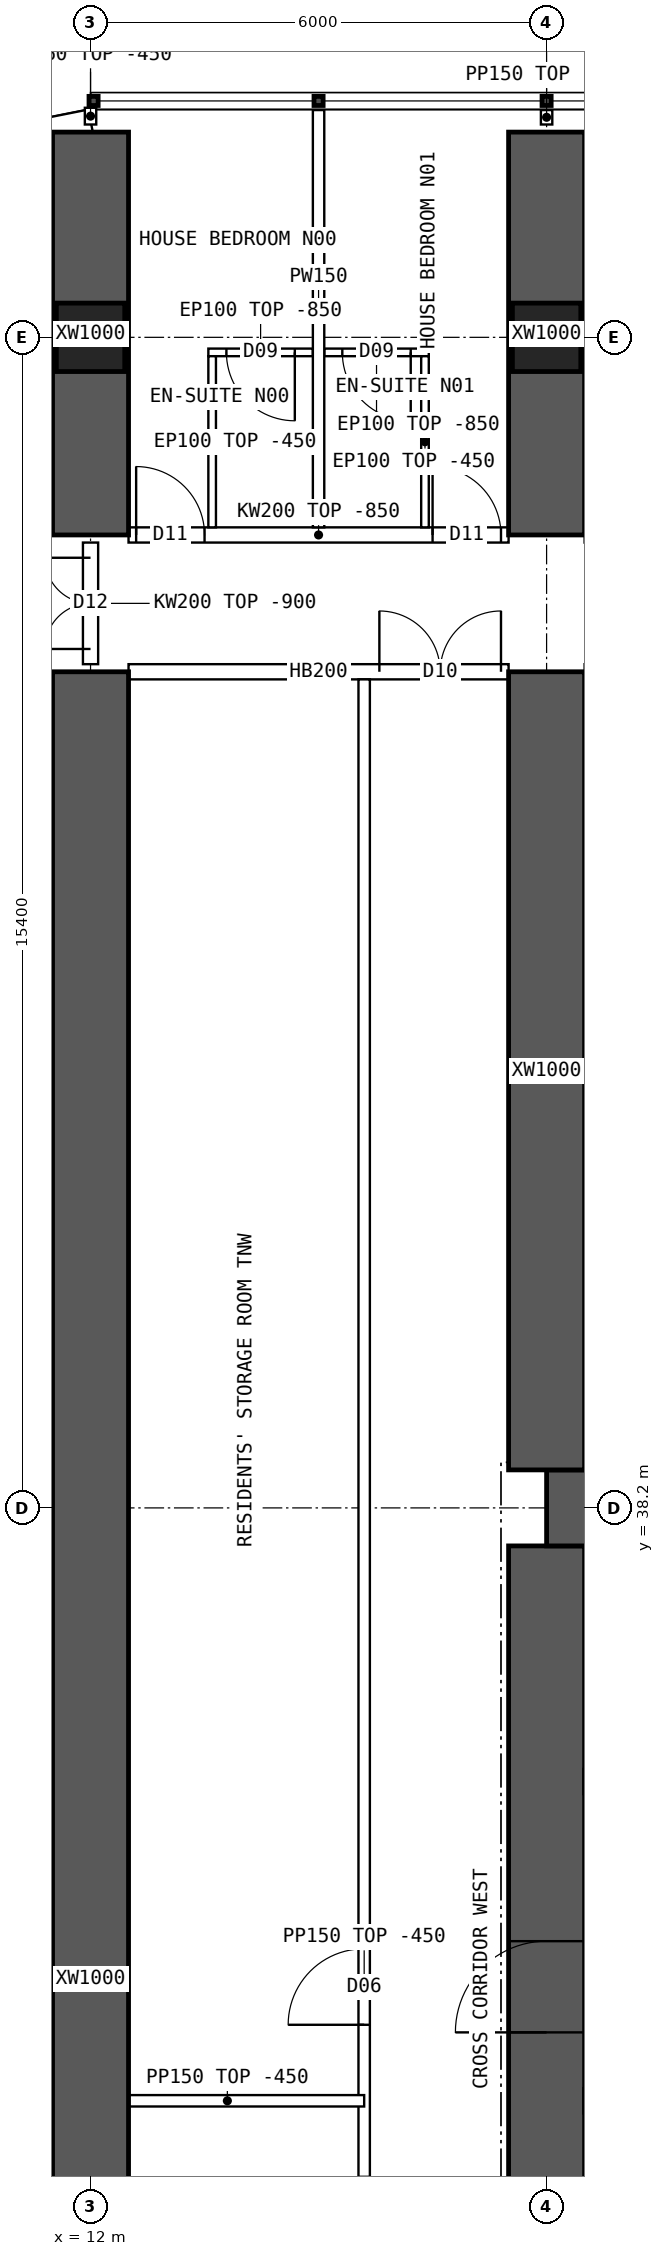
"""IFC4 building model, lengths in metres.
Left out: names, types, materials, properties, quantities, classifications, styles, units other than length and angle.
Written with IfcOpenShell. Run it as: python <this file> out.ifc"""

import sys

from ifc_helpers import new_model, si_unit, direction, frame, frame_2d, origin, origin_2d, place, context, subcontext, project, spatial, polyline, rectangle, hollow_rectangle, outline, extrude, element, fill, save


model = new_model("IFC4")
c1 = context("Model", 3, precision=1e-05, world=origin(), true_north=direction((0.0, 1.0)))
c2 = subcontext(c1, "Body", "Model", "MODEL_VIEW")
j1 = project(units=[si_unit("LENGTHUNIT", "METRE"), si_unit("PLANEANGLEUNIT", "RADIAN")], contexts=[c1])
p1 = place(None, origin())
s1 = spatial("IfcSite", under=j1, at=p1, CompositionType="ELEMENT")
p2 = place(p1, origin())
s2 = spatial("IfcBuilding", under=s1, at=p2, CompositionType="ELEMENT")
p3 = place(p2, frame((0.0, 0.0, 35.2)))
s3 = spatial("IfcBuildingStorey", under=s2, at=p3, CompositionType="ELEMENT", Elevation=35.2)
for number, where, z_axis, x_axis in (
    (1, (12.0, 53.6, 0.0), (0.0, 0.0, 1.0), (1.0, 0.0, 0.0)),
    (2, (18.0, 53.6, 0.0), (0.0, 0.0, 1.0), (1.0, 0.0, 0.0)),
):
    element("IfcColumn", number, at=place(p3, frame(where, z_axis=z_axis, x_axis=x_axis)), inside=s3, PredefinedType="COLUMN", context=c2, shape_type="SweptSolid", body=[
        extrude(hollow_rectangle(XDim=0.9, YDim=0.9, WallThickness=0.09, at=origin_2d()), origin(), (0.0, 0.0, 1.0), 3.75),
    ])
p4 = place(p3, frame((18.0, 38.2, 0.0), z_axis=(0.0, 0.0, 1.0), x_axis=(1.0, 0.0, 0.0)))
e3 = element("IfcWall", 3, at=p4, inside=s3, PredefinedType="SHEAR", context=c2, shape_type="SweptSolid", body=[
    extrude(rectangle(XDim=48.0, YDim=1.0, at=frame_2d((24.0, 0.0))), origin(), (0.0, 0.0, 1.0), 3.75),
])
p5 = place(p3, frame((18.0, 26.3, 0.0), z_axis=(0.0, 0.0, 1.0), x_axis=(0.0, 1.0, 0.0)))
e4 = element("IfcWall", 4, at=p5, inside=s3, PredefinedType="SHEAR", context=c2, shape_type="SweptSolid", body=[
    extrude(rectangle(XDim=11.4, YDim=1.0, at=frame_2d((5.7, 0.0))), origin(), (0.0, 0.0, 1.0), 3.75),
])
p6 = place(p5, frame((5.0, 0.0, 0.0)))
e5 = element("IfcOpeningElement", 5, at=p6, cuts=e4, PredefinedType="OPENING", context=c2, shape_type="SweptSolid", body=[
    extrude(rectangle(XDim=1.2, YDim=2.1, at=frame_2d((0.6, 1.05))), frame((0.0, 0.51, 0.0), z_axis=(0.0, -1.0, 0.0), x_axis=(1.0, 0.0, 0.0)), (0.0, 0.0, 1.0), 1.02),
])
p7 = place(p3, frame((12.0, 51.0, 0.0), z_axis=(0.0, 0.0, 1.0), x_axis=(0.0, 1.0, 0.0)))
e6 = element("IfcWall", 6, at=p7, inside=s3, PredefinedType="SHEAR", context=c2, shape_type="SweptSolid", body=[
    extrude(rectangle(XDim=5.3, YDim=1.0, at=frame_2d((2.65, 0.0))), origin(), (0.0, 0.0, 1.0), 3.75),
])
p8 = place(p3, frame((12.0, 14.8, 0.0), z_axis=(0.0, 0.0, 1.0), x_axis=(0.0, 1.0, 0.0)))
e7 = element("IfcWall", 7, at=p8, inside=s3, PredefinedType="SHEAR", context=c2, shape_type="SweptSolid", body=[
    extrude(rectangle(XDim=34.4, YDim=1.0, at=frame_2d((17.2, 0.0))), origin(), (0.0, 0.0, 1.0), 3.75),
])
p9 = place(p3, frame((18.0, 51.0, 0.0), z_axis=(0.0, 0.0, 1.0), x_axis=(0.0, 1.0, 0.0)))
e8 = element("IfcWall", 8, at=p9, inside=s3, PredefinedType="SHEAR", context=c2, shape_type="SweptSolid", body=[
    extrude(rectangle(XDim=5.3, YDim=1.0, at=frame_2d((2.65, 0.0))), origin(), (0.0, 0.0, 1.0), 3.75),
])
p10 = place(p3, frame((18.0, 38.7, 0.0), z_axis=(0.0, 0.0, 1.0), x_axis=(0.0, 1.0, 0.0)))
e9 = element("IfcWall", 9, at=p10, inside=s3, PredefinedType="SHEAR", context=c2, shape_type="SweptSolid", body=[
    extrude(rectangle(XDim=10.5, YDim=1.0, at=frame_2d((5.25, 0.0))), origin(), (0.0, 0.0, 1.0), 3.75),
])
p11 = place(p3, frame((12.0, 56.45, 0.0), z_axis=(0.0, 0.0, 1.0), x_axis=(-0.980787251524, -0.195080412259, 0.0)))
e10 = element("IfcWall", 10, at=p11, inside=s3, PredefinedType="SOLIDWALL", context=c2, shape_type="SweptSolid", body=[
    extrude(outline(polyline([(-0.03, -0.15), (3.249, -0.15), (3.189, 0.15), (0.03, 0.15), (-0.03, -0.15)])), origin(), (0.0, 0.0, 1.0), 3.3),
])
p12 = place(p11, frame((0.909, 0.0, 0.9)))
e11 = element("IfcOpeningElement", 11, at=p12, cuts=e10, PredefinedType="OPENING", context=c2, shape_type="SweptSolid", body=[
    extrude(rectangle(XDim=1.4, YDim=1.8, at=frame_2d((0.7, 0.9))), frame((0.0, 0.16, 0.0), z_axis=(0.0, -1.0, 0.0), x_axis=(1.0, 0.0, 0.0)), (0.0, 0.0, 1.0), 0.32),
])
p13 = place(p3, frame((12.5, 51.0, 0.0), z_axis=(0.0, 0.0, 1.0), x_axis=(1.0, 0.0, 0.0)))
e12 = element("IfcWall", 12, at=p13, inside=s3, PredefinedType="SOLIDWALL", context=c2, shape_type="SweptSolid", body=[
    extrude(outline(polyline([(0.0, 0.0), (5.0, 0.0), (5.0, 2.9), (0.0, 2.9), (0.0, 0.0)])), frame((0.0, 0.1, 0.0), z_axis=(0.0, -1.0, 0.0), x_axis=(1.0, 0.0, 0.0)), (0.0, 0.0, 1.0), 0.2),
])
p14 = place(p13, frame((0.1, 0.0, 0.0)))
e13 = element("IfcOpeningElement", 13, at=p14, cuts=e12, PredefinedType="OPENING", context=c2, shape_type="SweptSolid", body=[
    extrude(rectangle(XDim=0.9, YDim=2.1, at=frame_2d((0.45, 1.05))), frame((0.0, 0.11, 0.0), z_axis=(0.0, -1.0, 0.0), x_axis=(1.0, 0.0, 0.0)), (0.0, 0.0, 1.0), 0.22),
])
p15 = place(p13, frame((4.0, 0.0, 0.0)))
e14 = element("IfcOpeningElement", 14, at=p15, cuts=e12, PredefinedType="OPENING", context=c2, shape_type="SweptSolid", body=[
    extrude(rectangle(XDim=0.9, YDim=2.1, at=frame_2d((0.45, 1.05))), frame((0.0, 0.11, 0.0), z_axis=(0.0, -1.0, 0.0), x_axis=(1.0, 0.0, 0.0)), (0.0, 0.0, 1.0), 0.22),
])
p16 = place(p3, frame((12.5, 49.2, 0.0), z_axis=(0.0, 0.0, 1.0), x_axis=(1.0, 0.0, 0.0)))
e15 = element("IfcWall", 15, at=p16, inside=s3, PredefinedType="SOLIDWALL", context=c2, shape_type="SweptSolid", body=[
    extrude(rectangle(XDim=5.0, YDim=0.2, at=frame_2d((2.5, 0.0))), origin(), (0.0, 0.0, 1.0), 3.3),
])
p17 = place(p16, frame((3.3, 0.0, 0.0)))
e16 = element("IfcOpeningElement", 16, at=p17, cuts=e15, PredefinedType="OPENING", context=c2, shape_type="SweptSolid", body=[
    extrude(rectangle(XDim=1.6, YDim=2.1, at=frame_2d((0.8, 1.05))), frame((0.0, 0.11, 0.0), z_axis=(0.0, -1.0, 0.0), x_axis=(1.0, 0.0, 0.0)), (0.0, 0.0, 1.0), 0.22),
])
p18 = place(p3, frame((15.0, 56.59, 0.0), z_axis=(0.0, 0.0, 1.0), x_axis=(0.0, -1.0, 0.0)))
e17 = element("IfcWall", 17, at=p18, inside=s3, PredefinedType="PARTITIONING", context=c2, shape_type="SweptSolid", body=[
    extrude(outline(polyline([(0.0, 0.0), (5.49, 0.0), (5.49, 2.9), (5.442, 2.9), (5.44, 3.3), (3.192, 3.3), (3.19, 2.9), (2.792, 2.9), (2.79, 3.3), (0.0, 3.3), (0.0, 0.0)])), frame((0.0, 0.075, 0.0), z_axis=(0.0, -1.0, 0.0), x_axis=(1.0, 0.0, 0.0)), (0.0, 0.0, 1.0), 0.15),
])
p19 = place(p3, frame((13.55, 53.402, 0.0), z_axis=(0.0, 0.0, 1.0), x_axis=(1.0, 0.0, 0.0)))
e18 = element("IfcWall", 18, at=p19, inside=s3, PredefinedType="PARTITIONING", context=c2, shape_type="SweptSolid", body=[
    extrude(outline(polyline([(0.0, 0.0), (1.375, 0.0), (1.375, 2.9), (0.0, 2.9), (0.0, 0.0)])), frame((0.0, 0.05, 0.0), z_axis=(0.0, -1.0, 0.0), x_axis=(1.0, 0.0, 0.0)), (0.0, 0.0, 1.0), 0.1),
])
p20 = place(p19, frame((0.238, 0.0, 0.0)))
e19 = element("IfcOpeningElement", 19, at=p20, cuts=e18, PredefinedType="OPENING", context=c2, shape_type="SweptSolid", body=[
    extrude(rectangle(XDim=0.9, YDim=2.1, at=frame_2d((0.45, 1.05))), frame((0.0, 0.06, 0.0), z_axis=(0.0, -1.0, 0.0), x_axis=(1.0, 0.0, 0.0)), (0.0, 0.0, 1.0), 0.12),
])
p21 = place(p3, frame((13.6, 53.352, 0.0), z_axis=(0.0, 0.0, 1.0), x_axis=(0.0, -1.0, 0.0)))
e20 = element("IfcWall", 20, at=p21, inside=s3, PredefinedType="PARTITIONING", context=c2, shape_type="SweptSolid", body=[
    extrude(outline(polyline([(0.0, 0.0), (2.252, 0.0), (2.252, 2.9), (2.204, 2.9), (2.202, 3.3), (0.0, 3.3), (0.0, 0.0)])), frame((0.0, 0.05, 0.0), z_axis=(0.0, -1.0, 0.0), x_axis=(1.0, 0.0, 0.0)), (0.0, 0.0, 1.0), 0.1),
])
p22 = place(p3, frame((15.075, 53.402, 0.0), z_axis=(0.0, 0.0, 1.0), x_axis=(1.0, 0.0, 0.0)))
e21 = element("IfcWall", 21, at=p22, inside=s3, PredefinedType="PARTITIONING", context=c2, shape_type="SweptSolid", body=[
    extrude(outline(polyline([(0.0, 0.0), (1.375, 0.0), (1.375, 2.9), (0.0, 2.9), (0.0, 0.0)])), frame((0.0, 0.05, 0.0), z_axis=(0.0, -1.0, 0.0), x_axis=(1.0, 0.0, 0.0)), (0.0, 0.0, 1.0), 0.1),
])
p23 = place(p22, frame((0.238, 0.0, 0.0)))
e22 = element("IfcOpeningElement", 22, at=p23, cuts=e21, PredefinedType="OPENING", context=c2, shape_type="SweptSolid", body=[
    extrude(rectangle(XDim=0.9, YDim=2.1, at=frame_2d((0.45, 1.05))), frame((0.0, 0.06, 0.0), z_axis=(0.0, -1.0, 0.0), x_axis=(1.0, 0.0, 0.0)), (0.0, 0.0, 1.0), 0.12),
])
p24 = place(p3, frame((16.4, 53.352, 0.0), z_axis=(0.0, 0.0, 1.0), x_axis=(0.0, -1.0, 0.0)))
e23 = element("IfcWall", 23, at=p24, inside=s3, PredefinedType="PARTITIONING", context=c2, shape_type="SweptSolid", body=[
    extrude(outline(polyline([(0.0, 0.0), (2.252, 0.0), (2.252, 2.9), (2.204, 2.9), (2.202, 3.3), (0.0, 3.3), (0.0, 0.0)])), frame((0.0, 0.05, 0.0), z_axis=(0.0, -1.0, 0.0), x_axis=(1.0, 0.0, 0.0)), (0.0, 0.0, 1.0), 0.1),
])
p25 = place(p3, frame((15.6, 14.9, 0.0), z_axis=(0.0, 0.0, 1.0), x_axis=(0.0, 1.0, 0.0)))
e24 = element("IfcWall", 24, at=p25, inside=s3, PredefinedType="PARTITIONING", context=c2, shape_type="SweptSolid", body=[
    extrude(rectangle(XDim=34.2, YDim=0.15, at=frame_2d((17.1, 0.0))), origin(), (0.0, 0.0, 1.0), 3.3),
])
p26 = place(p25, frame((13.5, 0.0, 0.0)))
e25 = element("IfcOpeningElement", 25, at=p26, cuts=e24, PredefinedType="OPENING", context=c2, shape_type="SweptSolid", body=[
    extrude(rectangle(XDim=1.0, YDim=2.1, at=frame_2d((0.5, 1.05))), frame((0.0, 0.085, 0.0), z_axis=(0.0, -1.0, 0.0), x_axis=(1.0, 0.0, 0.0)), (0.0, 0.0, 1.0), 0.17),
])
p27 = place(p25, frame((16.5, 0.0, 0.0)))
e26 = element("IfcOpeningElement", 26, at=p27, cuts=e24, PredefinedType="OPENING", context=c2, shape_type="SweptSolid", body=[
    extrude(rectangle(XDim=1.0, YDim=2.1, at=frame_2d((0.5, 1.05))), frame((0.0, 0.085, 0.0), z_axis=(0.0, -1.0, 0.0), x_axis=(1.0, 0.0, 0.0)), (0.0, 0.0, 1.0), 0.17),
])
p28 = place(p3, frame((12.0, 30.4, 0.0), z_axis=(0.0, 0.0, 1.0), x_axis=(1.0, 0.0, 0.0)))
e27 = element("IfcWall", 27, at=p28, inside=s3, PredefinedType="PARTITIONING", context=c2, shape_type="SweptSolid", body=[
    extrude(rectangle(XDim=3.6, YDim=0.15, at=frame_2d((1.8, 0.0))), origin(), (0.0, 0.0, 1.0), 3.3),
])
p29 = place(p3, frame((3.905, 30.85, 0.0), z_axis=(0.0, 0.0, 1.0), x_axis=(1.0, 0.0, 0.0)))
e28 = element("IfcWall", 28, at=p29, inside=s3, PredefinedType="PARTITIONING", context=c2, shape_type="SweptSolid", body=[
    extrude(outline(polyline([(0.0, 0.0), (8.02, 0.0), (8.02, 3.3), (2.397, 3.3), (2.395, 2.85), (1.797, 2.85), (1.795, 3.3), (0.0, 3.3), (0.0, 0.0)])), frame((0.0, 0.075, 0.0), z_axis=(0.0, -1.0, 0.0), x_axis=(1.0, 0.0, 0.0)), (0.0, 0.0, 1.0), 0.15),
])
p30 = place(p3, frame((12.0, 49.3, 0.0), z_axis=(0.0, 0.0, 1.0), x_axis=(0.0, 1.0, 0.0)))
e29 = element("IfcWall", 29, at=p30, inside=s3, PredefinedType="SOLIDWALL", context=c2, shape_type="SweptSolid", body=[
    extrude(outline(polyline([(0.0, 0.0), (1.6, 0.0), (1.6, 2.85), (0.0, 2.85), (0.0, 0.0)])), frame((0.0, 0.1, 0.0), z_axis=(0.0, -1.0, 0.0), x_axis=(1.0, 0.0, 0.0)), (0.0, 0.0, 1.0), 0.2),
])
p31 = place(p30, frame((0.2, 0.0, 0.0)))
e30 = element("IfcOpeningElement", 30, at=p31, cuts=e29, PredefinedType="OPENING", context=c2, shape_type="SweptSolid", body=[
    extrude(rectangle(XDim=1.2, YDim=2.1, at=frame_2d((0.6, 1.05))), frame((0.0, 0.11, 0.0), z_axis=(0.0, -1.0, 0.0), x_axis=(1.0, 0.0, 0.0)), (0.0, 0.0, 1.0), 0.22),
])
p32 = place(p3, frame((12.0, 56.4, 0.0), z_axis=(0.0, 0.0, 1.0), x_axis=(0.0, 1.0, 0.0)))
e31 = element("IfcWall", 31, at=p32, inside=s3, PredefinedType="PARTITIONING", context=c2, shape_type="SweptSolid", body=[
    extrude(rectangle(XDim=0.22, YDim=0.15, at=frame_2d((0.11, 0.0))), origin(), (0.0, 0.0, 1.0), 3.3),
])
p33 = place(p3, frame((18.0, 56.4, 0.0), z_axis=(0.0, 0.0, 1.0), x_axis=(0.0, 1.0, 0.0)))
e32 = element("IfcWall", 32, at=p33, inside=s3, PredefinedType="PARTITIONING", context=c2, shape_type="SweptSolid", body=[
    extrude(rectangle(XDim=0.19, YDim=0.15, at=frame_2d((0.095, 0.0))), origin(), (0.0, 0.0, 1.0), 3.3),
])
p34 = place(p6, origin())
e33 = element("IfcDoor", 33, at=p34, inside=s3, OperationType="SINGLE_SWING_LEFT", PredefinedType="DOOR", context=c2, shape_type="SweptSolid", body=[
    extrude(rectangle(XDim=1.2, YDim=2.1, at=frame_2d((0.6, 1.05))), frame((0.0, 0.025, 0.0), z_axis=(0.0, -1.0, 0.0), x_axis=(1.0, 0.0, 0.0)), (0.0, 0.0, 1.0), 0.05),
])
fill(e5, e33)
p35 = place(p17, origin())
e34 = element("IfcDoor", 34, at=p35, inside=s3, OperationType="DOUBLE_DOOR_SINGLE_SWING", PredefinedType="DOOR", context=c2, shape_type="SweptSolid", body=[
    extrude(rectangle(XDim=1.6, YDim=2.1, at=frame_2d((0.8, 1.05))), frame((0.0, 0.025, 0.0), z_axis=(0.0, -1.0, 0.0), x_axis=(1.0, 0.0, 0.0)), (0.0, 0.0, 1.0), 0.05),
])
fill(e16, e34)
p36 = place(p20, origin())
e35 = element("IfcDoor", 35, at=p36, inside=s3, OperationType="SINGLE_SWING_RIGHT", PredefinedType="DOOR", context=c2, shape_type="SweptSolid", body=[
    extrude(rectangle(XDim=0.9, YDim=2.1, at=frame_2d((0.45, 1.05))), frame((0.0, 0.025, 0.0), z_axis=(0.0, -1.0, 0.0), x_axis=(1.0, 0.0, 0.0)), (0.0, 0.0, 1.0), 0.05),
])
fill(e19, e35)
p37 = place(p14, origin())
e36 = element("IfcDoor", 36, at=p37, inside=s3, OperationType="SINGLE_SWING_LEFT", PredefinedType="DOOR", context=c2, shape_type="SweptSolid", body=[
    extrude(rectangle(XDim=0.9, YDim=2.1, at=frame_2d((0.45, 1.05))), frame((0.0, 0.025, 0.0), z_axis=(0.0, -1.0, 0.0), x_axis=(1.0, 0.0, 0.0)), (0.0, 0.0, 1.0), 0.05),
])
fill(e13, e36)
p38 = place(p23, origin())
e37 = element("IfcDoor", 37, at=p38, inside=s3, OperationType="SINGLE_SWING_RIGHT", PredefinedType="DOOR", context=c2, shape_type="SweptSolid", body=[
    extrude(rectangle(XDim=0.9, YDim=2.1, at=frame_2d((0.45, 1.05))), frame((0.0, 0.025, 0.0), z_axis=(0.0, -1.0, 0.0), x_axis=(1.0, 0.0, 0.0)), (0.0, 0.0, 1.0), 0.05),
])
fill(e22, e37)
p39 = place(p15, origin())
e38 = element("IfcDoor", 38, at=p39, inside=s3, OperationType="SINGLE_SWING_LEFT", PredefinedType="DOOR", context=c2, shape_type="SweptSolid", body=[
    extrude(rectangle(XDim=0.9, YDim=2.1, at=frame_2d((0.45, 1.05))), frame((0.0, 0.025, 0.0), z_axis=(0.0, -1.0, 0.0), x_axis=(1.0, 0.0, 0.0)), (0.0, 0.0, 1.0), 0.05),
])
fill(e14, e38)
p40 = place(p27, origin())
e39 = element("IfcDoor", 39, at=p40, inside=s3, OperationType="SINGLE_SWING_LEFT", PredefinedType="DOOR", context=c2, shape_type="SweptSolid", body=[
    extrude(rectangle(XDim=1.0, YDim=2.1, at=frame_2d((0.5, 1.05))), frame((0.0, 0.025, 0.0), z_axis=(0.0, -1.0, 0.0), x_axis=(1.0, 0.0, 0.0)), (0.0, 0.0, 1.0), 0.05),
])
fill(e26, e39)
p41 = place(p31, origin())
e40 = element("IfcDoor", 40, at=p41, inside=s3, OperationType="DOUBLE_DOOR_SINGLE_SWING", PredefinedType="DOOR", context=c2, shape_type="SweptSolid", body=[
    extrude(rectangle(XDim=1.2, YDim=2.1, at=frame_2d((0.6, 1.05))), frame((0.0, 0.025, 0.0), z_axis=(0.0, -1.0, 0.0), x_axis=(1.0, 0.0, 0.0)), (0.0, 0.0, 1.0), 0.05),
])
fill(e30, e40)
save(model, sys.argv[1])
